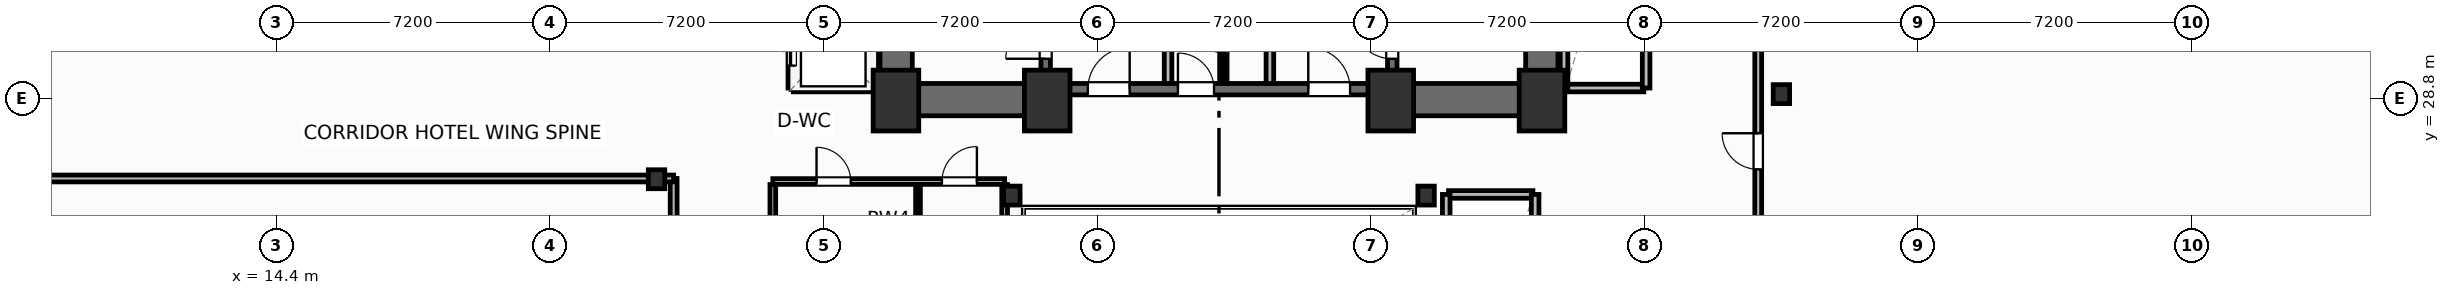
"""IFC4 building model, lengths in metres.
Left out: names, types, materials, properties, quantities, classifications, styles, units other than length and angle.
Written with IfcOpenShell. Run it as: python <this file> out.ifc"""

import sys

from ifc_helpers import new_model, si_unit, direction, frame, frame_2d, origin, origin_2d, place, context, subcontext, project, spatial, rectangle, i_section, extrude, element, fill, save


model = new_model("IFC4")
c1 = context("Model", 3, precision=1e-05, world=origin(), true_north=direction((0.0, 1.0)))
c2 = subcontext(c1, "Body", "Model", "MODEL_VIEW")
j1 = project(units=[si_unit("LENGTHUNIT", "METRE"), si_unit("PLANEANGLEUNIT", "RADIAN")], contexts=[c1])
p1 = place(None, origin())
s1 = spatial("IfcSite", under=j1, at=p1, CompositionType="ELEMENT")
p2 = place(p1, origin())
s2 = spatial("IfcBuilding", under=s1, at=p2, CompositionType="ELEMENT")
p3 = place(p2, frame((0.0, 0.0, 27.0)))
s3 = spatial("IfcBuildingStorey", under=s2, at=p3, CompositionType="ELEMENT", Elevation=27.0)
for number, where, z_axis, x_axis in (
    (1, (30.7, 28.75, 0.0), (0.0, 0.0, 1.0), (1.0, 0.0, 0.0)),
    (2, (34.68, 28.75, 0.0), (0.0, 0.0, 1.0), (1.0, 0.0, 0.0)),
    (3, (43.72, 28.75, 0.0), (0.0, 0.0, 1.0), (1.0, 0.0, 0.0)),
    (4, (47.7, 28.75, 0.0), (0.0, 0.0, 1.0), (1.0, 0.0, 0.0)),
):
    element("IfcColumn", number, at=place(p3, frame(where, z_axis=z_axis, x_axis=x_axis)), inside=s3, PredefinedType="COLUMN", context=c2, shape_type="SweptSolid", body=[
        extrude(rectangle(XDim=1.2, YDim=1.6, at=origin_2d()), origin(), (0.0, 0.0, 1.0), 3.7),
    ])
for number, where, z_axis, x_axis in (
    (5, (33.75, 26.25, 0.0), (0.0, 0.0, 1.0), (1.0, 0.0, 0.0)),
    (6, (44.65, 26.25, 0.0), (0.0, 0.0, 1.0), (1.0, 0.0, 0.0)),
    (7, (24.4, 26.68, 0.0), (0.0, 0.0, 1.0), (1.0, 0.0, 0.0)),
    (8, (54.0, 28.92, 0.0), (0.0, 0.0, 1.0), (1.0, 0.0, 0.0)),
):
    element("IfcColumn", number, at=place(p3, frame(where, z_axis=z_axis, x_axis=x_axis)), inside=s3, PredefinedType="COLUMN", context=c2, shape_type="SweptSolid", body=[
        extrude(i_section(OverallWidth=0.432, OverallDepth=0.498, WebThickness=0.056, FlangeThickness=0.089, FilletRadius=0.025, at=origin_2d()), origin(), (0.0, 0.0, 1.0), 3.7),
    ])
for number, where, z_axis, x_axis in (
    (9, (30.705, 29.2, 0.0), (0.0, 0.0, 1.0), (0.0, 1.0, 0.0)),
    (10, (47.695, 29.2, 0.0), (0.0, 0.0, 1.0), (0.0, 1.0, 0.0)),
):
    element("IfcWall", number, at=place(p3, frame(where, z_axis=z_axis, x_axis=x_axis)), inside=s3, PredefinedType="SHEAR", context=c2, shape_type="SweptSolid", body=[
        extrude(rectangle(XDim=9.22, YDim=0.85, at=frame_2d((4.61, 0.0))), origin(), (0.0, 0.0, 1.0), 3.45),
    ])
for number, where, z_axis, x_axis in (
    (11, (30.28, 28.775, 0.0), (0.0, 0.0, 1.0), (1.0, 0.0, 0.0)),
    (12, (43.6, 28.775, 0.0), (0.0, 0.0, 1.0), (1.0, 0.0, 0.0)),
):
    element("IfcWall", number, at=place(p3, frame(where, z_axis=z_axis, x_axis=x_axis)), inside=s3, PredefinedType="SHEAR", context=c2, shape_type="SweptSolid", body=[
        extrude(rectangle(XDim=4.52, YDim=0.85, at=frame_2d((2.26, 0.0))), origin(), (0.0, 0.0, 1.0), 3.45),
    ])
p4 = place(p3, frame((34.8, 29.05, 0.0), z_axis=(0.0, 0.0, 1.0), x_axis=(1.0, 0.0, 0.0)))
e13 = element("IfcWall", 13, at=p4, inside=s3, PredefinedType="SHEAR", context=c2, shape_type="SweptSolid", body=[
    extrude(rectangle(XDim=8.8, YDim=0.3, at=frame_2d((4.4, 0.0))), origin(), (0.0, 0.0, 1.0), 3.45),
])
p5 = place(p4, frame((0.95, 0.0, 0.0)))
e14 = element("IfcOpeningElement", 14, at=p5, cuts=e13, PredefinedType="OPENING", context=c2, shape_type="SweptSolid", body=[
    extrude(rectangle(XDim=1.1, YDim=2.15, at=frame_2d((0.55, 1.075))), frame((0.0, 0.16, 0.0), z_axis=(0.0, -1.0, 0.0), x_axis=(1.0, 0.0, 0.0)), (0.0, 0.0, 1.0), 0.32),
])
p6 = place(p4, frame((6.75, 0.0, 0.0)))
e15 = element("IfcOpeningElement", 15, at=p6, cuts=e13, PredefinedType="OPENING", context=c2, shape_type="SweptSolid", body=[
    extrude(rectangle(XDim=1.1, YDim=2.15, at=frame_2d((0.55, 1.075))), frame((0.0, 0.16, 0.0), z_axis=(0.0, -1.0, 0.0), x_axis=(1.0, 0.0, 0.0)), (0.0, 0.0, 1.0), 0.32),
])
p7 = place(p4, frame((3.32, 0.0, 0.0)))
e16 = element("IfcOpeningElement", 16, at=p7, cuts=e13, PredefinedType="OPENING", context=c2, shape_type="SweptSolid", body=[
    extrude(rectangle(XDim=0.95, YDim=2.15, at=frame_2d((0.475, 1.075))), frame((0.0, 0.16, 0.0), z_axis=(0.0, -1.0, 0.0), x_axis=(1.0, 0.0, 0.0)), (0.0, 0.0, 1.0), 0.32),
])
p8 = place(p3, frame((34.64, 29.2, 0.0), z_axis=(0.0, 0.0, 1.0), x_axis=(0.0, 1.0, 0.0)))
e17 = element("IfcWall", 17, at=p8, inside=s3, PredefinedType="SHEAR", context=c2, shape_type="SweptSolid", body=[
    extrude(rectangle(XDim=9.22, YDim=0.25, at=frame_2d((4.61, 0.0))), origin(), (0.0, 0.0, 1.0), 3.45),
])
p9 = place(p8, frame((0.65, 0.0, 0.0)))
e18 = element("IfcOpeningElement", 18, at=p9, cuts=e17, PredefinedType="OPENING", context=c2, shape_type="SweptSolid", body=[
    extrude(rectangle(XDim=1.05, YDim=2.15, at=frame_2d((0.525, 1.075))), frame((0.0, 0.135, 0.0), z_axis=(0.0, -1.0, 0.0), x_axis=(1.0, 0.0, 0.0)), (0.0, 0.0, 1.0), 0.27),
])
p10 = place(p3, frame((43.76, 29.2, 0.0), z_axis=(0.0, 0.0, 1.0), x_axis=(0.0, 1.0, 0.0)))
e19 = element("IfcWall", 19, at=p10, inside=s3, PredefinedType="SHEAR", context=c2, shape_type="SweptSolid", body=[
    extrude(rectangle(XDim=9.22, YDim=0.25, at=frame_2d((4.61, 0.0))), origin(), (0.0, 0.0, 1.0), 3.45),
])
p11 = place(p10, frame((0.65, 0.0, 0.0)))
e20 = element("IfcOpeningElement", 20, at=p11, cuts=e19, PredefinedType="OPENING", context=c2, shape_type="SweptSolid", body=[
    extrude(rectangle(XDim=1.05, YDim=2.15, at=frame_2d((0.525, 1.075))), frame((0.0, 0.135, 0.0), z_axis=(0.0, -1.0, 0.0), x_axis=(1.0, 0.0, 0.0)), (0.0, 0.0, 1.0), 0.27),
])
p12 = place(p3, frame((81.127, 26.995, 0.0), z_axis=(0.0, 0.0, 1.0), x_axis=(-0.823530169317, 0.567272474411, 0.0)))
e21 = element("IfcWall", 21, at=p12, inside=s3, PredefinedType="SOLIDWALL", context=c2, shape_type="SweptSolid", body=[
    extrude(rectangle(XDim=23.247, YDim=0.22, at=frame_2d((11.624, 0.0))), origin(), (0.0, 0.0, 1.0), 2.73),
])
p13 = place(p12, frame((10.799, 0.0, 0.8)))
e22 = element("IfcOpeningElement", 22, at=p13, cuts=e21, PredefinedType="OPENING", context=c2, shape_type="SweptSolid", body=[
    extrude(rectangle(XDim=1.65, YDim=1.65, at=frame_2d((0.825, 0.825))), frame((0.0, 0.12, 0.0), z_axis=(0.0, -1.0, 0.0), x_axis=(1.0, 0.0, 0.0)), (0.0, 0.0, 1.0), 0.24),
])
p14 = place(p3, frame((24.85, 19.2, 0.0), z_axis=(0.0, 0.0, 1.0), x_axis=(0.0, 1.0, 0.0)))
e23 = element("IfcWall", 23, at=p14, inside=s3, PredefinedType="PARTITIONING", context=c2, shape_type="SweptSolid", body=[
    extrude(rectangle(XDim=7.5, YDim=0.18, at=frame_2d((3.75, 0.0))), origin(), (0.0, 0.0, 1.0), 3.45),
])
p15 = place(p14, frame((3.275, 0.0, 0.0)))
e24 = element("IfcOpeningElement", 24, at=p15, cuts=e23, PredefinedType="OPENING", context=c2, shape_type="SweptSolid", body=[
    extrude(rectangle(XDim=0.95, YDim=2.05, at=frame_2d((0.475, 1.025))), frame((0.0, 0.1, 0.0), z_axis=(0.0, -1.0, 0.0), x_axis=(1.0, 0.0, 0.0)), (0.0, 0.0, 1.0), 0.2),
])
p16 = place(p3, frame((0.2, 26.7, 0.0), z_axis=(0.0, 0.0, 1.0), x_axis=(1.0, 0.0, 0.0)))
e25 = element("IfcWall", 25, at=p16, inside=s3, PredefinedType="PARTITIONING", context=c2, shape_type="SweptSolid", body=[
    extrude(rectangle(XDim=24.65, YDim=0.18, at=frame_2d((12.325, 0.0))), origin(), (0.0, 0.0, 1.0), 2.662),
])
p17 = place(p3, frame((53.39, 19.24, 0.0), z_axis=(0.0, 0.0, 1.0), x_axis=(0.0, 1.0, 0.0)))
e26 = element("IfcWall", 26, at=p17, inside=s3, PredefinedType="PARTITIONING", context=c2, shape_type="SweptSolid", body=[
    extrude(rectangle(XDim=20.06, YDim=0.18, at=frame_2d((10.03, 0.0))), origin(), (0.0, 0.0, 1.0), 3.45),
])
p18 = place(p17, frame((7.7, 0.0, 0.0)))
e27 = element("IfcOpeningElement", 27, at=p18, cuts=e26, PredefinedType="OPENING", context=c2, shape_type="SweptSolid", body=[
    extrude(rectangle(XDim=0.95, YDim=2.05, at=frame_2d((0.475, 1.025))), frame((0.0, 0.1, 0.0), z_axis=(0.0, -1.0, 0.0), x_axis=(1.0, 0.0, 0.0)), (0.0, 0.0, 1.0), 0.2),
])
for number, where, z_axis, x_axis in (
    (28, (37.86, 29.2, 0.0), (0.0, 0.0, 1.0), (0.0, 1.0, 0.0)),
    (29, (40.54, 29.2, 0.0), (0.0, 0.0, 1.0), (0.0, 1.0, 0.0)),
):
    element("IfcWall", number, at=place(p3, frame(where, z_axis=z_axis, x_axis=x_axis)), inside=s3, PredefinedType="PARTITIONING", context=c2, shape_type="SweptSolid", body=[
        extrude(rectangle(XDim=5.18, YDim=0.2, at=frame_2d((2.59, 0.0))), origin(), (0.0, 0.0, 1.0), 3.45),
    ])
p19 = place(p3, frame((39.35, 29.2, 0.0), z_axis=(0.0, 0.0, 1.0), x_axis=(0.0, 1.0, 0.0)))
e30 = element("IfcWall", 30, at=p19, inside=s3, PredefinedType="PARTITIONING", context=c2, shape_type="SweptSolid", body=[
    extrude(rectangle(XDim=5.22, YDim=0.125, at=frame_2d((2.61, 0.0))), origin(), (0.0, 0.0, 1.0), 3.45),
])
p20 = place(p19, frame((0.8, 0.0, 0.0)))
e31 = element("IfcOpeningElement", 31, at=p20, cuts=e30, PredefinedType="OPENING", context=c2, shape_type="SweptSolid", body=[
    extrude(rectangle(XDim=0.85, YDim=2.05, at=frame_2d((0.425, 1.025))), frame((0.0, 0.073, 0.0), z_axis=(0.0, -1.0, 0.0), x_axis=(1.0, 0.0, 0.0)), (0.0, 0.0, 1.0), 0.145),
])
p21 = place(p19, frame((3.4, 0.0, 0.0)))
e32 = element("IfcOpeningElement", 32, at=p21, cuts=e30, PredefinedType="OPENING", context=c2, shape_type="SweptSolid", body=[
    extrude(rectangle(XDim=0.85, YDim=2.05, at=frame_2d((0.425, 1.025))), frame((0.0, 0.073, 0.0), z_axis=(0.0, -1.0, 0.0), x_axis=(1.0, 0.0, 0.0)), (0.0, 0.0, 1.0), 0.145),
])
p22 = place(p3, frame((27.46, 26.62, 0.0), z_axis=(0.0, 0.0, 1.0), x_axis=(1.0, 0.0, 0.0)))
e33 = element("IfcWall", 33, at=p22, inside=s3, PredefinedType="PARTITIONING", context=c2, shape_type="SweptSolid", body=[
    extrude(rectangle(XDim=6.1, YDim=0.15, at=frame_2d((3.05, 0.0))), origin(), (0.0, 0.0, 1.0), 2.662),
])
p23 = place(p22, frame((1.15, 0.0, 0.0)))
e34 = element("IfcOpeningElement", 34, at=p23, cuts=e33, PredefinedType="OPENING", context=c2, shape_type="SweptSolid", body=[
    extrude(rectangle(XDim=0.9, YDim=2.05, at=frame_2d((0.45, 1.025))), frame((0.0, 0.085, 0.0), z_axis=(0.0, -1.0, 0.0), x_axis=(1.0, 0.0, 0.0)), (0.0, 0.0, 1.0), 0.17),
])
p24 = place(p22, frame((4.45, 0.0, 0.0)))
e35 = element("IfcOpeningElement", 35, at=p24, cuts=e33, PredefinedType="OPENING", context=c2, shape_type="SweptSolid", body=[
    extrude(rectangle(XDim=0.92, YDim=2.05, at=frame_2d((0.46, 1.025))), frame((0.0, 0.085, 0.0), z_axis=(0.0, -1.0, 0.0), x_axis=(1.0, 0.0, 0.0)), (0.0, 0.0, 1.0), 0.17),
])
p25 = place(p3, frame((31.28, 19.38, 0.0), z_axis=(0.0, 0.0, 1.0), x_axis=(0.0, 1.0, 0.0)))
e36 = element("IfcWall", 36, at=p25, inside=s3, PredefinedType="PARTITIONING", context=c2, shape_type="SweptSolid", body=[
    extrude(rectangle(XDim=7.16, YDim=0.125, at=frame_2d((3.58, 0.0))), origin(), (0.0, 0.0, 1.0), 3.45),
])
p26 = place(p3, frame((27.46, 19.38, 0.0), z_axis=(0.0, 0.0, 1.0), x_axis=(0.0, 1.0, 0.0)))
e37 = element("IfcWall", 37, at=p26, inside=s3, PredefinedType="PARTITIONING", context=c2, shape_type="SweptSolid", body=[
    extrude(rectangle(XDim=7.16, YDim=0.15, at=frame_2d((3.58, 0.0))), origin(), (0.0, 0.0, 1.0), 3.45),
])
p27 = place(p26, frame((1.4, 0.0, 0.0)))
e38 = element("IfcOpeningElement", 38, at=p27, cuts=e37, PredefinedType="OPENING", context=c2, shape_type="SweptSolid", body=[
    extrude(rectangle(XDim=0.95, YDim=2.05, at=frame_2d((0.475, 1.025))), frame((0.0, 0.085, 0.0), z_axis=(0.0, -1.0, 0.0), x_axis=(1.0, 0.0, 0.0)), (0.0, 0.0, 1.0), 0.17),
])
p28 = place(p3, frame((33.56, 19.38, 0.0), z_axis=(0.0, 0.0, 1.0), x_axis=(0.0, 1.0, 0.0)))
e39 = element("IfcWall", 39, at=p28, inside=s3, PredefinedType="PARTITIONING", context=c2, shape_type="SweptSolid", body=[
    extrude(rectangle(XDim=7.16, YDim=0.15, at=frame_2d((3.58, 0.0))), origin(), (0.0, 0.0, 1.0), 2.824),
])
p29 = place(p3, frame((28.0, 29.08, 0.0), z_axis=(0.0, 0.0, 1.0), x_axis=(1.0, 0.0, 0.0)))
e40 = element("IfcWall", 40, at=p29, inside=s3, PredefinedType="PARTITIONING", context=c2, shape_type="SweptSolid", body=[
    extrude(rectangle(XDim=2.1, YDim=0.2, at=frame_2d((1.05, 0.0))), origin(), (0.0, 0.0, 1.0), 3.45),
])
p30 = place(p3, frame((30.12, 29.08, 0.0), z_axis=(0.0, 0.0, 1.0), x_axis=(0.0, 1.0, 0.0)))
e41 = element("IfcWall", 41, at=p30, inside=s3, PredefinedType="PARTITIONING", context=c2, shape_type="SweptSolid", body=[
    extrude(rectangle(XDim=6.89, YDim=0.2, at=frame_2d((3.445, 0.0))), origin(), (0.0, 0.0, 1.0), 3.45),
])
p31 = place(p3, frame((27.96, 29.08, 0.0), z_axis=(0.0, 0.0, 1.0), x_axis=(0.0, 1.0, 0.0)))
e42 = element("IfcWall", 42, at=p31, inside=s3, PredefinedType="PARTITIONING", context=c2, shape_type="SweptSolid", body=[
    extrude(rectangle(XDim=6.89, YDim=0.2, at=frame_2d((3.445, 0.0))), origin(), (0.0, 0.0, 1.0), 3.45),
])
p32 = place(p31, frame((0.59, 0.0, 0.0)))
e43 = element("IfcOpeningElement", 43, at=p32, cuts=e42, PredefinedType="OPENING", context=c2, shape_type="SweptSolid", body=[
    extrude(rectangle(XDim=1.1, YDim=2.15, at=frame_2d((0.55, 1.075))), frame((0.0, 0.11, 0.0), z_axis=(0.0, -1.0, 0.0), x_axis=(1.0, 0.0, 0.0)), (0.0, 0.0, 1.0), 0.22),
])
p33 = place(p31, frame((2.89, 0.0, 0.0)))
e44 = element("IfcOpeningElement", 44, at=p33, cuts=e42, PredefinedType="OPENING", context=c2, shape_type="SweptSolid", body=[
    extrude(rectangle(XDim=1.1, YDim=2.15, at=frame_2d((0.55, 1.075))), frame((0.0, 0.11, 0.0), z_axis=(0.0, -1.0, 0.0), x_axis=(1.0, 0.0, 0.0)), (0.0, 0.0, 1.0), 0.22),
])
p34 = place(p31, frame((5.19, 0.0, 0.0)))
e45 = element("IfcOpeningElement", 45, at=p34, cuts=e42, PredefinedType="OPENING", context=c2, shape_type="SweptSolid", body=[
    extrude(rectangle(XDim=1.1, YDim=2.15, at=frame_2d((0.55, 1.075))), frame((0.0, 0.11, 0.0), z_axis=(0.0, -1.0, 0.0), x_axis=(1.0, 0.0, 0.0)), (0.0, 0.0, 1.0), 0.22),
])
p35 = place(p3, frame((48.32, 29.08, 0.0), z_axis=(0.0, 0.0, 1.0), x_axis=(1.0, 0.0, 0.0)))
e46 = element("IfcWall", 46, at=p35, inside=s3, PredefinedType="PARTITIONING", context=c2, shape_type="SweptSolid", body=[
    extrude(rectangle(XDim=2.06, YDim=0.2, at=frame_2d((1.03, 0.0))), origin(), (0.0, 0.0, 1.0), 2.662),
])
for number, where, z_axis, x_axis in (
    (47, (48.28, 29.08, 0.0), (0.0, 0.0, 1.0), (0.0, 1.0, 0.0)),
    (48, (50.44, 29.08, 0.0), (0.0, 0.0, 1.0), (0.0, 1.0, 0.0)),
):
    element("IfcWall", number, at=place(p3, frame(where, z_axis=z_axis, x_axis=x_axis)), inside=s3, PredefinedType="PARTITIONING", context=c2, shape_type="SweptSolid", body=[
        extrude(rectangle(XDim=6.89, YDim=0.2, at=frame_2d((3.445, 0.0))), origin(), (0.0, 0.0, 1.0), 3.45),
    ])
p36 = place(p3, frame((45.24, 26.28, 0.0), z_axis=(0.0, 0.0, 1.0), x_axis=(1.0, 0.0, 0.0)))
e49 = element("IfcWall", 49, at=p36, inside=s3, PredefinedType="PARTITIONING", context=c2, shape_type="SweptSolid", body=[
    extrude(rectangle(XDim=2.22, YDim=0.2, at=frame_2d((1.11, 0.0))), origin(), (0.0, 0.0, 1.0), 3.45),
])
for number, where, z_axis, x_axis in (
    (50, (45.18, 19.38, 0.0), (0.0, 0.0, 1.0), (0.0, 1.0, 0.0)),
    (51, (47.52, 19.38, 0.0), (0.0, 0.0, 1.0), (0.0, 1.0, 0.0)),
):
    element("IfcWall", number, at=place(p3, frame(where, z_axis=z_axis, x_axis=x_axis)), inside=s3, PredefinedType="PARTITIONING", context=c2, shape_type="SweptSolid", body=[
        extrude(rectangle(XDim=6.9, YDim=0.2, at=frame_2d((3.45, 0.0))), origin(), (0.0, 0.0, 1.0), 3.45),
    ])
p37 = place(p18, origin())
e52 = element("IfcDoor", 52, at=p37, inside=s3, OperationType="SINGLE_SWING_RIGHT", PredefinedType="DOOR", context=c2, shape_type="SweptSolid", body=[
    extrude(rectangle(XDim=0.95, YDim=2.05, at=frame_2d((0.475, 1.025))), frame((0.0, 0.025, 0.0), z_axis=(0.0, -1.0, 0.0), x_axis=(1.0, 0.0, 0.0)), (0.0, 0.0, 1.0), 0.05),
])
fill(e27, e52)
p38 = place(p9, origin())
e53 = element("IfcDoor", 53, at=p38, inside=s3, OperationType="SINGLE_SWING_LEFT", PredefinedType="DOOR", context=c2, shape_type="SweptSolid", body=[
    extrude(rectangle(XDim=1.05, YDim=2.15, at=frame_2d((0.525, 1.075))), frame((0.0, 0.025, 0.0), z_axis=(0.0, -1.0, 0.0), x_axis=(1.0, 0.0, 0.0)), (0.0, 0.0, 1.0), 0.05),
])
fill(e18, e53)
p39 = place(p11, origin())
e54 = element("IfcDoor", 54, at=p39, inside=s3, OperationType="SINGLE_SWING_RIGHT", PredefinedType="DOOR", context=c2, shape_type="SweptSolid", body=[
    extrude(rectangle(XDim=1.05, YDim=2.15, at=frame_2d((0.525, 1.075))), frame((0.0, 0.025, 0.0), z_axis=(0.0, -1.0, 0.0), x_axis=(1.0, 0.0, 0.0)), (0.0, 0.0, 1.0), 0.05),
])
fill(e20, e54)
p40 = place(p5, origin())
e55 = element("IfcDoor", 55, at=p40, inside=s3, OperationType="SINGLE_SWING_RIGHT", PredefinedType="DOOR", context=c2, shape_type="SweptSolid", body=[
    extrude(rectangle(XDim=1.1, YDim=2.15, at=frame_2d((0.55, 1.075))), frame((0.0, 0.025, 0.0), z_axis=(0.0, -1.0, 0.0), x_axis=(1.0, 0.0, 0.0)), (0.0, 0.0, 1.0), 0.05),
])
fill(e14, e55)
p41 = place(p6, origin())
e56 = element("IfcDoor", 56, at=p41, inside=s3, OperationType="SINGLE_SWING_LEFT", PredefinedType="DOOR", context=c2, shape_type="SweptSolid", body=[
    extrude(rectangle(XDim=1.1, YDim=2.15, at=frame_2d((0.55, 1.075))), frame((0.0, 0.025, 0.0), z_axis=(0.0, -1.0, 0.0), x_axis=(1.0, 0.0, 0.0)), (0.0, 0.0, 1.0), 0.05),
])
fill(e15, e56)
p42 = place(p20, origin())
e57 = element("IfcDoor", 57, at=p42, inside=s3, OperationType="SINGLE_SWING_RIGHT", PredefinedType="DOOR", context=c2, shape_type="SweptSolid", body=[
    extrude(rectangle(XDim=0.85, YDim=2.05, at=frame_2d((0.425, 1.025))), frame((0.0, 0.025, 0.0), z_axis=(0.0, -1.0, 0.0), x_axis=(1.0, 0.0, 0.0)), (0.0, 0.0, 1.0), 0.05),
])
fill(e31, e57)
p43 = place(p7, origin())
e58 = element("IfcDoor", 58, at=p43, inside=s3, OperationType="SINGLE_SWING_LEFT", PredefinedType="DOOR", context=c2, shape_type="SweptSolid", body=[
    extrude(rectangle(XDim=0.95, YDim=2.15, at=frame_2d((0.475, 1.075))), frame((0.0, 0.025, 0.0), z_axis=(0.0, -1.0, 0.0), x_axis=(1.0, 0.0, 0.0)), (0.0, 0.0, 1.0), 0.05),
])
fill(e16, e58)
p44 = place(p23, origin())
e59 = element("IfcDoor", 59, at=p44, inside=s3, OperationType="SINGLE_SWING_LEFT", PredefinedType="DOOR", context=c2, shape_type="SweptSolid", body=[
    extrude(rectangle(XDim=0.9, YDim=2.05, at=frame_2d((0.45, 1.025))), frame((0.0, 0.025, 0.0), z_axis=(0.0, -1.0, 0.0), x_axis=(1.0, 0.0, 0.0)), (0.0, 0.0, 1.0), 0.05),
])
fill(e34, e59)
p45 = place(p24, origin())
e60 = element("IfcDoor", 60, at=p45, inside=s3, OperationType="SINGLE_SWING_RIGHT", PredefinedType="DOOR", context=c2, shape_type="SweptSolid", body=[
    extrude(rectangle(XDim=0.92, YDim=2.05, at=frame_2d((0.46, 1.025))), frame((0.0, 0.025, 0.0), z_axis=(0.0, -1.0, 0.0), x_axis=(1.0, 0.0, 0.0)), (0.0, 0.0, 1.0), 0.05),
])
fill(e35, e60)
p46 = place(p32, origin())
e61 = element("IfcDoor", 61, at=p46, inside=s3, OperationType="SLIDING_TO_LEFT", PredefinedType="DOOR", context=c2, shape_type="SweptSolid", body=[
    extrude(rectangle(XDim=1.1, YDim=2.15, at=frame_2d((0.55, 1.075))), frame((0.0, 0.025, 0.0), z_axis=(0.0, -1.0, 0.0), x_axis=(1.0, 0.0, 0.0)), (0.0, 0.0, 1.0), 0.05),
])
fill(e43, e61)
save(model, sys.argv[1])
